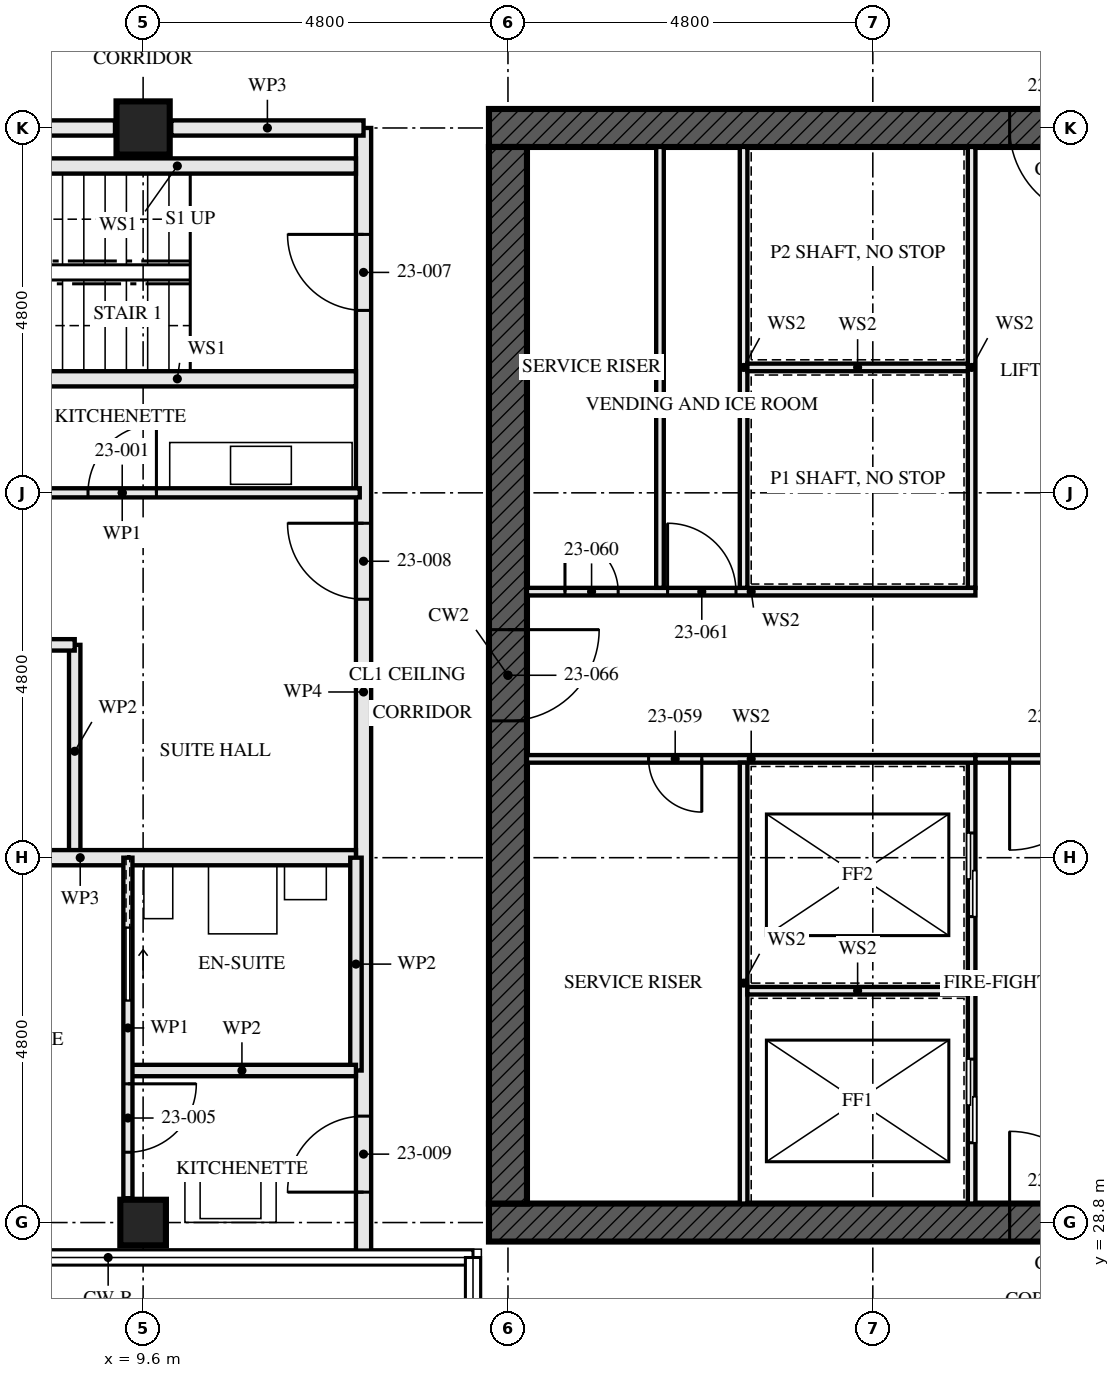
"""IFC4 building model, lengths in metres.
Left out: names, types, materials, properties, quantities, classifications, styles, units other than length and angle.
Written with IfcOpenShell. Run it as: python <this file> out.ifc"""

import sys

from ifc_helpers import new_model, si_unit, direction, frame, frame_2d, origin, origin_2d, place, context, subcontext, project, spatial, rectangle, hollow_rectangle, extrude, element, fill, save


model = new_model("IFC4")
c1 = context("Model", 3, precision=1e-05, world=origin(), true_north=direction((0.0, 1.0)))
c2 = subcontext(c1, "Body", "Model", "MODEL_VIEW")
j1 = project(units=[si_unit("LENGTHUNIT", "METRE"), si_unit("PLANEANGLEUNIT", "RADIAN")], contexts=[c1])
p1 = place(None, origin())
s1 = spatial("IfcSite", under=j1, at=p1, CompositionType="ELEMENT")
p2 = place(p1, origin())
s2 = spatial("IfcBuilding", under=s1, at=p2, CompositionType="ELEMENT")
p3 = place(p2, frame((0.0, 0.0, 87.5)))
s3 = spatial("IfcBuildingStorey", under=s2, at=p3, CompositionType="ELEMENT", Elevation=87.5)
p4 = place(p3, frame((9.6, 28.8, 0.0), z_axis=(0.0, 0.0, 1.0), x_axis=(0.0, 1.0, 0.0)))
e1 = element("IfcColumn", 1, at=p4, inside=s3, PredefinedType="COLUMN", context=c2, shape_type="SweptSolid", body=[
    extrude(hollow_rectangle(XDim=0.6, YDim=0.6, WallThickness=0.08, at=origin_2d()), origin(), (0.0, 0.0, 1.0), 3.5),
])
p5 = place(p3, frame((9.6, 43.2, 0.0), z_axis=(0.0, 0.0, 1.0), x_axis=(0.0, 1.0, 0.0)))
e2 = element("IfcColumn", 2, at=p5, inside=s3, PredefinedType="COLUMN", context=c2, shape_type="SweptSolid", body=[
    extrude(hollow_rectangle(XDim=0.7, YDim=0.7, WallThickness=0.06, at=origin_2d()), origin(), (0.0, 0.0, 1.0), 3.5),
])
p6 = place(p3, frame((14.15, 28.8, -0.17), z_axis=(0.0, 0.0, 1.0), x_axis=(1.0, 0.0, 0.0)))
e3 = element("IfcWall", 3, at=p6, inside=s3, PredefinedType="SHEAR", context=c2, shape_type="SweptSolid", body=[
    extrude(rectangle(XDim=14.9, YDim=0.5, at=frame_2d((7.45, 0.0))), origin(), (0.0, 0.0, 1.0), 3.5),
])
p7 = place(p6, frame((6.85, 0.0, 0.17)))
e4 = element("IfcOpeningElement", 4, at=p7, cuts=e3, PredefinedType="OPENING", context=c2, shape_type="SweptSolid", body=[
    extrude(rectangle(XDim=1.2, YDim=2.1, at=frame_2d((0.6, 1.05))), frame((0.0, 0.26, 0.0), z_axis=(0.0, -1.0, 0.0), x_axis=(1.0, 0.0, 0.0)), (0.0, 0.0, 1.0), 0.521),
])
p8 = place(p3, frame((29.05, 43.2, -0.17), z_axis=(0.0, 0.0, 1.0), x_axis=(-1.0, 0.0, 0.0)))
e5 = element("IfcWall", 5, at=p8, inside=s3, PredefinedType="SHEAR", context=c2, shape_type="SweptSolid", body=[
    extrude(rectangle(XDim=14.9, YDim=0.5, at=frame_2d((7.45, 0.0))), origin(), (0.0, 0.0, 1.0), 3.5),
])
p9 = place(p8, frame((6.85, 0.0, 0.17)))
e6 = element("IfcOpeningElement", 6, at=p9, cuts=e5, PredefinedType="OPENING", context=c2, shape_type="SweptSolid", body=[
    extrude(rectangle(XDim=1.2, YDim=2.1, at=frame_2d((0.6, 1.05))), frame((0.0, 0.26, 0.0), z_axis=(0.0, -1.0, 0.0), x_axis=(1.0, 0.0, 0.0)), (0.0, 0.0, 1.0), 0.521),
])
p10 = place(p3, frame((14.4, 42.95, -0.17), z_axis=(0.0, 0.0, 1.0), x_axis=(0.0, -1.0, 0.0)))
e7 = element("IfcWall", 7, at=p10, inside=s3, PredefinedType="SHEAR", context=c2, shape_type="SweptSolid", body=[
    extrude(rectangle(XDim=13.9, YDim=0.5, at=frame_2d((6.95, 0.0))), origin(), (0.0, 0.0, 1.0), 3.5),
])
p11 = place(p10, frame((6.35, 0.0, 0.17)))
e8 = element("IfcOpeningElement", 8, at=p11, cuts=e7, PredefinedType="OPENING", context=c2, shape_type="SweptSolid", body=[
    extrude(rectangle(XDim=1.2, YDim=2.1, at=frame_2d((0.6, 1.05))), frame((0.0, 0.26, 0.0), z_axis=(0.0, -1.0, 0.0), x_axis=(1.0, 0.0, 0.0)), (0.0, 0.0, 1.0), 0.521),
])
for number, where, z_axis, x_axis in (
    (9, (7.7, 42.7, 0.0), (0.0, 0.0, 1.0), (1.0, 0.0, 0.0)),
    (10, (7.7, 39.9, 0.0), (0.0, 0.0, 1.0), (1.0, 0.0, 0.0)),
):
    element("IfcWall", number, at=place(p3, frame(where, z_axis=z_axis, x_axis=x_axis)), inside=s3, PredefinedType="SOLIDWALL", context=c2, shape_type="SweptSolid", body=[
        extrude(rectangle(XDim=4.7, YDim=0.2, at=frame_2d((2.35, 0.0))), origin(), (0.0, 0.0, 1.0), 2.99),
    ])
p12 = place(p3, frame((5.7, 36.4, 0.0), z_axis=(0.0, 0.0, 1.0), x_axis=(1.0, 0.0, 0.0)))
e11 = element("IfcWall", 11, at=p12, inside=s3, PredefinedType="PARTITIONING", context=c2, shape_type="SweptSolid", body=[
    extrude(rectangle(XDim=3.0, YDim=0.15, at=frame_2d((1.5, 0.0))), origin(), (0.0, 0.0, 1.0), 3.33),
])
p13 = place(p3, frame((8.7, 36.4, 0.0), z_axis=(0.0, 0.0, 1.0), x_axis=(0.0, -1.0, 0.0)))
e12 = element("IfcWall", 12, at=p13, inside=s3, PredefinedType="PARTITIONING", context=c2, shape_type="SweptSolid", body=[
    extrude(rectangle(XDim=2.8, YDim=0.15, at=frame_2d((1.4, 0.0))), origin(), (0.0, 0.0, 1.0), 3.33),
])
p14 = place(p3, frame((6.2, 38.4, 0.0), z_axis=(0.0, 0.0, 1.0), x_axis=(1.0, 0.0, 0.0)))
e13 = element("IfcWall", 13, at=p14, inside=s3, PredefinedType="PARTITIONING", context=c2, shape_type="SweptSolid", body=[
    extrude(rectangle(XDim=6.25, YDim=0.12, at=frame_2d((3.125, 0.0))), origin(), (0.0, 0.0, 1.0), 2.55),
])
p15 = place(p14, frame((2.675, 0.0, 0.0)))
e14 = element("IfcOpeningElement", 14, at=p15, cuts=e13, PredefinedType="OPENING", context=c2, shape_type="SweptSolid", body=[
    extrude(rectangle(XDim=0.9, YDim=2.1, at=frame_2d((0.45, 1.05))), frame((0.0, 0.071, 0.0), z_axis=(0.0, -1.0, 0.0), x_axis=(1.0, 0.0, 0.0)), (0.0, 0.0, 1.0), 0.141),
])
p16 = place(p3, frame((5.145, 33.6, 0.0), z_axis=(0.0, 0.0, 1.0), x_axis=(1.0, 0.0, 0.0)))
e15 = element("IfcWall", 15, at=p16, inside=s3, PredefinedType="PARTITIONING", context=c2, shape_type="SweptSolid", body=[
    extrude(rectangle(XDim=7.255, YDim=0.2, at=frame_2d((3.627, 0.0))), origin(), (0.0, 0.0, 1.0), 2.55),
])
p17 = place(p3, frame((9.4, 30.8, 0.0), z_axis=(0.0, 0.0, 1.0), x_axis=(1.0, 0.0, 0.0)))
e16 = element("IfcWall", 16, at=p17, inside=s3, PredefinedType="PARTITIONING", context=c2, shape_type="SweptSolid", body=[
    extrude(rectangle(XDim=3.0, YDim=0.15, at=frame_2d((1.5, 0.0))), origin(), (0.0, 0.0, 1.0), 3.33),
])
p18 = place(p3, frame((12.4, 33.6, 0.0), z_axis=(0.0, 0.0, 1.0), x_axis=(0.0, -1.0, 0.0)))
e17 = element("IfcWall", 17, at=p18, inside=s3, PredefinedType="PARTITIONING", context=c2, shape_type="SweptSolid", body=[
    extrude(rectangle(XDim=2.8, YDim=0.15, at=frame_2d((1.4, 0.0))), origin(), (0.0, 0.0, 1.0), 3.33),
])
p19 = place(p3, frame((9.4, 33.6, 0.0), z_axis=(0.0, 0.0, 1.0), x_axis=(0.0, -1.0, 0.0)))
e18 = element("IfcWall", 18, at=p19, inside=s3, PredefinedType="PARTITIONING", context=c2, shape_type="SweptSolid", body=[
    extrude(rectangle(XDim=4.48, YDim=0.12, at=frame_2d((2.24, 0.0))), origin(), (0.0, 0.0, 1.0), 3.33),
])
p20 = place(p19, frame((2.975, 0.0, 0.0)))
e19 = element("IfcOpeningElement", 19, at=p20, cuts=e18, PredefinedType="OPENING", context=c2, shape_type="SweptSolid", body=[
    extrude(rectangle(XDim=0.9, YDim=2.1, at=frame_2d((0.45, 1.05))), frame((0.0, 0.071, 0.0), z_axis=(0.0, -1.0, 0.0), x_axis=(1.0, 0.0, 0.0)), (0.0, 0.0, 1.0), 0.141),
])
p21 = place(p19, frame((0.925, 0.0, 0.0)))
e20 = element("IfcOpeningElement", 20, at=p21, cuts=e18, PredefinedType="OPENING", context=c2, shape_type="SweptSolid", body=[
    extrude(rectangle(XDim=0.95, YDim=2.1, at=frame_2d((0.475, 1.05))), frame((0.0, 0.071, 0.0), z_axis=(0.0, -1.0, 0.0), x_axis=(1.0, 0.0, 0.0)), (0.0, 0.0, 1.0), 0.141),
])
p22 = place(p3, frame((12.5, 43.2, 0.0), z_axis=(0.0, 0.0, 1.0), x_axis=(0.0, -1.0, 0.0)))
e21 = element("IfcWall", 21, at=p22, inside=s3, PredefinedType="PARTITIONING", context=c2, shape_type="SweptSolid", body=[
    extrude(rectangle(XDim=14.84, YDim=0.2, at=frame_2d((7.42, 0.0))), origin(), (0.0, 0.0, 1.0), 2.32),
])
p23 = place(p22, frame((1.4, 0.0, 0.0)))
e22 = element("IfcOpeningElement", 22, at=p23, cuts=e21, PredefinedType="OPENING", context=c2, shape_type="SweptSolid", body=[
    extrude(rectangle(XDim=1.0, YDim=2.1, at=frame_2d((0.5, 1.05))), frame((0.0, 0.111, 0.0), z_axis=(0.0, -1.0, 0.0), x_axis=(1.0, 0.0, 0.0)), (0.0, 0.0, 1.0), 0.221),
])
p24 = place(p22, frame((5.2, 0.0, 0.0)))
e23 = element("IfcOpeningElement", 23, at=p24, cuts=e21, PredefinedType="OPENING", context=c2, shape_type="SweptSolid", body=[
    extrude(rectangle(XDim=1.0, YDim=2.1, at=frame_2d((0.5, 1.05))), frame((0.0, 0.111, 0.0), z_axis=(0.0, -1.0, 0.0), x_axis=(1.0, 0.0, 0.0)), (0.0, 0.0, 1.0), 0.221),
])
p25 = place(p22, frame((13.0, 0.0, 0.0)))
e24 = element("IfcOpeningElement", 24, at=p25, cuts=e21, PredefinedType="OPENING", context=c2, shape_type="SweptSolid", body=[
    extrude(rectangle(XDim=1.0, YDim=2.1, at=frame_2d((0.5, 1.05))), frame((0.0, 0.111, 0.0), z_axis=(0.0, -1.0, 0.0), x_axis=(1.0, 0.0, 0.0)), (0.0, 0.0, 1.0), 0.221),
])
p26 = place(p3, frame((16.4, 37.15, 0.0), z_axis=(0.0, 0.0, 1.0), x_axis=(0.0, 1.0, 0.0)))
e25 = element("IfcWall", 25, at=p26, inside=s3, PredefinedType="SOLIDWALL", context=c2, shape_type="SweptSolid", body=[
    extrude(rectangle(XDim=5.8, YDim=0.1, at=frame_2d((2.9, 0.0))), origin(), (0.0, 0.0, 1.0), 3.33),
])
p27 = place(p3, frame((20.5, 29.05, 0.0), z_axis=(0.0, 0.0, 1.0), x_axis=(0.0, 1.0, 0.0)))
e26 = element("IfcWall", 26, at=p27, inside=s3, PredefinedType="SOLIDWALL", context=c2, shape_type="SweptSolid", body=[
    extrude(rectangle(XDim=5.8, YDim=0.1, at=frame_2d((2.9, 0.0))), origin(), (0.0, 0.0, 1.0), 3.33),
])
p28 = place(p27, frame((0.8, 0.0, 0.0)))
e27 = element("IfcOpeningElement", 27, at=p28, cuts=e26, PredefinedType="OPENING", context=c2, shape_type="SweptSolid", body=[
    extrude(rectangle(XDim=1.1, YDim=2.3, at=frame_2d((0.55, 1.15))), frame((0.0, 0.061, 0.0), z_axis=(0.0, -1.0, 0.0), x_axis=(1.0, 0.0, 0.0)), (0.0, 0.0, 1.0), 0.121),
])
p29 = place(p27, frame((3.775, 0.0, 0.0)))
e28 = element("IfcOpeningElement", 28, at=p29, cuts=e26, PredefinedType="OPENING", context=c2, shape_type="SweptSolid", body=[
    extrude(rectangle(XDim=1.1, YDim=2.3, at=frame_2d((0.55, 1.15))), frame((0.0, 0.061, 0.0), z_axis=(0.0, -1.0, 0.0), x_axis=(1.0, 0.0, 0.0)), (0.0, 0.0, 1.0), 0.121),
])
p30 = place(p3, frame((20.5, 37.15, 0.0), z_axis=(0.0, 0.0, 1.0), x_axis=(0.0, 1.0, 0.0)))
e29 = element("IfcWall", 29, at=p30, inside=s3, PredefinedType="SOLIDWALL", context=c2, shape_type="SweptSolid", body=[
    extrude(rectangle(XDim=5.8, YDim=0.1, at=frame_2d((2.9, 0.0))), origin(), (0.0, 0.0, 1.0), 3.33),
])
p31 = place(p3, frame((14.65, 34.9, 0.0), z_axis=(0.0, 0.0, 1.0), x_axis=(1.0, 0.0, 0.0)))
e30 = element("IfcWall", 30, at=p31, inside=s3, PredefinedType="SOLIDWALL", context=c2, shape_type="SweptSolid", body=[
    extrude(rectangle(XDim=5.9, YDim=0.1, at=frame_2d((2.95, 0.0))), origin(), (0.0, 0.0, 1.0), 3.33),
])
p32 = place(p31, frame((1.6, 0.0, 0.0)))
e31 = element("IfcOpeningElement", 31, at=p32, cuts=e30, PredefinedType="OPENING", context=c2, shape_type="SweptSolid", body=[
    extrude(rectangle(XDim=0.7, YDim=2.1, at=frame_2d((0.35, 1.05))), frame((0.0, 0.061, 0.0), z_axis=(0.0, -1.0, 0.0), x_axis=(1.0, 0.0, 0.0)), (0.0, 0.0, 1.0), 0.121),
])
p33 = place(p3, frame((14.65, 37.1, 0.0), z_axis=(0.0, 0.0, 1.0), x_axis=(1.0, 0.0, 0.0)))
e32 = element("IfcWall", 32, at=p33, inside=s3, PredefinedType="SOLIDWALL", context=c2, shape_type="SweptSolid", body=[
    extrude(rectangle(XDim=5.9, YDim=0.1, at=frame_2d((2.95, 0.0))), origin(), (0.0, 0.0, 1.0), 3.33),
])
p34 = place(p33, frame((0.5, 0.0, 0.0)))
e33 = element("IfcOpeningElement", 33, at=p34, cuts=e32, PredefinedType="OPENING", context=c2, shape_type="SweptSolid", body=[
    extrude(rectangle(XDim=0.7, YDim=2.1, at=frame_2d((0.35, 1.05))), frame((0.0, 0.061, 0.0), z_axis=(0.0, -1.0, 0.0), x_axis=(1.0, 0.0, 0.0)), (0.0, 0.0, 1.0), 0.121),
])
p35 = place(p33, frame((1.85, 0.0, 0.0)))
e34 = element("IfcOpeningElement", 34, at=p35, cuts=e32, PredefinedType="OPENING", context=c2, shape_type="SweptSolid", body=[
    extrude(rectangle(XDim=0.9, YDim=2.1, at=frame_2d((0.45, 1.05))), frame((0.0, 0.061, 0.0), z_axis=(0.0, -1.0, 0.0), x_axis=(1.0, 0.0, 0.0)), (0.0, 0.0, 1.0), 0.121),
])
p36 = place(p3, frame((20.55, 34.9, 0.0), z_axis=(0.0, 0.0, 1.0), x_axis=(1.0, 0.0, 0.0)))
e35 = element("IfcWall", 35, at=p36, inside=s3, PredefinedType="SOLIDWALL", context=c2, shape_type="SweptSolid", body=[
    extrude(rectangle(XDim=2.5, YDim=0.1, at=frame_2d((1.25, 0.0))), origin(), (0.0, 0.0, 1.0), 3.33),
])
p37 = place(p36, frame((0.45, 0.0, 0.0)))
e36 = element("IfcOpeningElement", 36, at=p37, cuts=e35, PredefinedType="OPENING", context=c2, shape_type="SweptSolid", body=[
    extrude(rectangle(XDim=1.2, YDim=2.1, at=frame_2d((0.6, 1.05))), frame((0.0, 0.061, 0.0), z_axis=(0.0, -1.0, 0.0), x_axis=(1.0, 0.0, 0.0)), (0.0, 0.0, 1.0), 0.121),
])
p38 = place(p3, frame((17.5, 29.05, 0.0), z_axis=(0.0, 0.0, 1.0), x_axis=(0.0, 1.0, 0.0)))
e37 = element("IfcWall", 37, at=p38, inside=s3, PredefinedType="SOLIDWALL", context=c2, shape_type="SweptSolid", body=[
    extrude(rectangle(XDim=5.8, YDim=0.1, at=frame_2d((2.9, 0.0))), origin(), (0.0, 0.0, 1.0), 3.33),
])
p39 = place(p3, frame((17.55, 31.85, 0.0), z_axis=(0.0, 0.0, 1.0), x_axis=(1.0, 0.0, 0.0)))
e38 = element("IfcWall", 38, at=p39, inside=s3, PredefinedType="SOLIDWALL", context=c2, shape_type="SweptSolid", body=[
    extrude(rectangle(XDim=2.9, YDim=0.1, at=frame_2d((1.45, 0.0))), origin(), (0.0, 0.0, 1.0), 3.33),
])
p40 = place(p3, frame((17.5, 37.15, 0.0), z_axis=(0.0, 0.0, 1.0), x_axis=(0.0, 1.0, 0.0)))
e39 = element("IfcWall", 39, at=p40, inside=s3, PredefinedType="SOLIDWALL", context=c2, shape_type="SweptSolid", body=[
    extrude(rectangle(XDim=5.8, YDim=0.1, at=frame_2d((2.9, 0.0))), origin(), (0.0, 0.0, 1.0), 3.33),
])
p41 = place(p3, frame((17.55, 40.05, 0.0), z_axis=(0.0, 0.0, 1.0), x_axis=(1.0, 0.0, 0.0)))
e40 = element("IfcWall", 40, at=p41, inside=s3, PredefinedType="SOLIDWALL", context=c2, shape_type="SweptSolid", body=[
    extrude(rectangle(XDim=2.9, YDim=0.1, at=frame_2d((1.45, 0.0))), origin(), (0.0, 0.0, 1.0), 3.33),
])
p42 = place(p3, frame((12.5, 43.2, 0.0), z_axis=(0.0, 0.0, 1.0), x_axis=(-1.0, 0.0, 0.0)))
e41 = element("IfcWall", 41, at=p42, inside=s3, PredefinedType="PARTITIONING", context=c2, shape_type="SweptSolid", body=[
    extrude(rectangle(XDim=2.53, YDim=0.2, at=frame_2d((1.265, 0.0))), origin(), (0.0, 0.0, 1.0), 2.32),
])
p43 = place(p3, frame((9.23, 43.2, 0.0), z_axis=(0.0, 0.0, 1.0), x_axis=(-1.0, 0.0, 0.0)))
e42 = element("IfcWall", 42, at=p43, inside=s3, PredefinedType="PARTITIONING", context=c2, shape_type="SweptSolid", body=[
    extrude(rectangle(XDim=4.06, YDim=0.2, at=frame_2d((2.03, 0.0))), origin(), (0.0, 0.0, 1.0), 2.32),
])
p44 = place(p15, origin())
e43 = element("IfcDoor", 43, at=p44, inside=s3, OperationType="SINGLE_SWING_LEFT", PredefinedType="DOOR", context=c2, shape_type="SweptSolid", body=[
    extrude(rectangle(XDim=0.9, YDim=2.1, at=frame_2d((0.45, 1.05))), frame((0.0, 0.022, 0.0), z_axis=(0.0, -1.0, 0.0), x_axis=(1.0, 0.0, 0.0)), (0.0, 0.0, 1.0), 0.044),
])
fill(e14, e43)
p45 = place(p20, origin())
e44 = element("IfcDoor", 44, at=p45, inside=s3, OperationType="SINGLE_SWING_RIGHT", PredefinedType="DOOR", context=c2, shape_type="SweptSolid", body=[
    extrude(rectangle(XDim=0.9, YDim=2.1, at=frame_2d((0.45, 1.05))), frame((0.0, 0.022, 0.0), z_axis=(0.0, -1.0, 0.0), x_axis=(1.0, 0.0, 0.0)), (0.0, 0.0, 1.0), 0.044),
])
fill(e19, e44)
p46 = place(p21, origin())
e45 = element("IfcDoor", 45, at=p46, inside=s3, OperationType="SLIDING_TO_RIGHT", PredefinedType="DOOR", context=c2, shape_type="SweptSolid", body=[
    extrude(rectangle(XDim=0.95, YDim=2.1, at=frame_2d((0.475, 1.05))), frame((0.0, 0.022, 0.0), z_axis=(0.0, -1.0, 0.0), x_axis=(1.0, 0.0, 0.0)), (0.0, 0.0, 1.0), 0.044),
])
fill(e20, e45)
p47 = place(p23, frame((1.0, 0.0, 0.0), z_axis=(0.0, 0.0, 1.0), x_axis=(-1.0, 0.0, 0.0)))
e46 = element("IfcDoor", 46, at=p47, inside=s3, OperationType="SINGLE_SWING_LEFT", PredefinedType="DOOR", context=c2, shape_type="SweptSolid", body=[
    extrude(rectangle(XDim=1.0, YDim=2.1, at=frame_2d((0.5, 1.05))), frame((0.0, 0.032, 0.0), z_axis=(0.0, -1.0, 0.0), x_axis=(1.0, 0.0, 0.0)), (0.0, 0.0, 1.0), 0.064),
])
fill(e22, e46)
p48 = place(p24, frame((1.0, 0.0, 0.0), z_axis=(0.0, 0.0, 1.0), x_axis=(-1.0, 0.0, 0.0)))
e47 = element("IfcDoor", 47, at=p48, inside=s3, OperationType="SINGLE_SWING_LEFT", PredefinedType="DOOR", context=c2, shape_type="SweptSolid", body=[
    extrude(rectangle(XDim=1.0, YDim=2.1, at=frame_2d((0.5, 1.05))), frame((0.0, 0.027, 0.0), z_axis=(0.0, -1.0, 0.0), x_axis=(1.0, 0.0, 0.0)), (0.0, 0.0, 1.0), 0.054),
])
fill(e23, e47)
p49 = place(p25, frame((1.0, 0.0, 0.0), z_axis=(0.0, 0.0, 1.0), x_axis=(-1.0, 0.0, 0.0)))
e48 = element("IfcDoor", 48, at=p49, inside=s3, OperationType="SINGLE_SWING_RIGHT", PredefinedType="DOOR", context=c2, shape_type="SweptSolid", body=[
    extrude(rectangle(XDim=1.0, YDim=2.1, at=frame_2d((0.5, 1.05))), frame((0.0, 0.027, 0.0), z_axis=(0.0, -1.0, 0.0), x_axis=(1.0, 0.0, 0.0)), (0.0, 0.0, 1.0), 0.054),
])
fill(e24, e48)
p50 = place(p28, origin())
e49 = element("IfcDoor", 49, at=p50, inside=s3, OperationType="SLIDING_TO_LEFT", PredefinedType="DOOR", context=c2, shape_type="SweptSolid", body=[
    extrude(rectangle(XDim=1.1, YDim=2.3, at=frame_2d((0.55, 1.15))), frame((0.0, 0.05, 0.0), z_axis=(0.0, -1.0, 0.0), x_axis=(1.0, 0.0, 0.0)), (0.0, 0.0, 1.0), 0.1),
])
fill(e27, e49)
p51 = place(p29, origin())
e50 = element("IfcDoor", 50, at=p51, inside=s3, OperationType="SLIDING_TO_LEFT", PredefinedType="DOOR", context=c2, shape_type="SweptSolid", body=[
    extrude(rectangle(XDim=1.1, YDim=2.3, at=frame_2d((0.55, 1.15))), frame((0.0, 0.05, 0.0), z_axis=(0.0, -1.0, 0.0), x_axis=(1.0, 0.0, 0.0)), (0.0, 0.0, 1.0), 0.1),
])
fill(e28, e50)
p52 = place(p32, frame((0.7, 0.0, 0.0), z_axis=(0.0, 0.0, 1.0), x_axis=(-1.0, 0.0, 0.0)))
e51 = element("IfcDoor", 51, at=p52, inside=s3, OperationType="SINGLE_SWING_RIGHT", PredefinedType="DOOR", context=c2, shape_type="SweptSolid", body=[
    extrude(rectangle(XDim=0.7, YDim=2.1, at=frame_2d((0.35, 1.05))), frame((0.0, 0.027, 0.0), z_axis=(0.0, -1.0, 0.0), x_axis=(1.0, 0.0, 0.0)), (0.0, 0.0, 1.0), 0.054),
])
fill(e31, e51)
p53 = place(p34, origin())
e52 = element("IfcDoor", 52, at=p53, inside=s3, OperationType="SINGLE_SWING_RIGHT", PredefinedType="DOOR", context=c2, shape_type="SweptSolid", body=[
    extrude(rectangle(XDim=0.7, YDim=2.1, at=frame_2d((0.35, 1.05))), frame((0.0, 0.027, 0.0), z_axis=(0.0, -1.0, 0.0), x_axis=(1.0, 0.0, 0.0)), (0.0, 0.0, 1.0), 0.054),
])
fill(e33, e52)
p54 = place(p35, origin())
e53 = element("IfcDoor", 53, at=p54, inside=s3, OperationType="SINGLE_SWING_RIGHT", PredefinedType="DOOR", context=c2, shape_type="SweptSolid", body=[
    extrude(rectangle(XDim=0.9, YDim=2.1, at=frame_2d((0.45, 1.05))), frame((0.0, 0.027, 0.0), z_axis=(0.0, -1.0, 0.0), x_axis=(1.0, 0.0, 0.0)), (0.0, 0.0, 1.0), 0.054),
])
fill(e34, e53)
p55 = place(p37, frame((1.2, 0.0, 0.0), z_axis=(0.0, 0.0, 1.0), x_axis=(-1.0, 0.0, 0.0)))
e54 = element("IfcDoor", 54, at=p55, inside=s3, OperationType="SINGLE_SWING_LEFT", PredefinedType="DOOR", context=c2, shape_type="SweptSolid", body=[
    extrude(rectangle(XDim=1.2, YDim=2.1, at=frame_2d((0.6, 1.05))), frame((0.0, 0.027, 0.0), z_axis=(0.0, -1.0, 0.0), x_axis=(1.0, 0.0, 0.0)), (0.0, 0.0, 1.0), 0.054),
])
fill(e36, e54)
p56 = place(p7, origin())
e55 = element("IfcDoor", 55, at=p56, inside=s3, OperationType="SINGLE_SWING_LEFT", PredefinedType="DOOR", context=c2, shape_type="SweptSolid", body=[
    extrude(rectangle(XDim=1.2, YDim=2.1, at=frame_2d((0.6, 1.05))), frame((0.0, 0.027, 0.0), z_axis=(0.0, -1.0, 0.0), x_axis=(1.0, 0.0, 0.0)), (0.0, 0.0, 1.0), 0.054),
])
fill(e4, e55)
p57 = place(p11, origin())
e56 = element("IfcDoor", 56, at=p57, inside=s3, OperationType="SINGLE_SWING_LEFT", PredefinedType="DOOR", context=c2, shape_type="SweptSolid", body=[
    extrude(rectangle(XDim=1.2, YDim=2.1, at=frame_2d((0.6, 1.05))), frame((0.0, 0.027, 0.0), z_axis=(0.0, -1.0, 0.0), x_axis=(1.0, 0.0, 0.0)), (0.0, 0.0, 1.0), 0.054),
])
fill(e8, e56)
p58 = place(p9, origin())
e57 = element("IfcDoor", 57, at=p58, inside=s3, OperationType="SINGLE_SWING_LEFT", PredefinedType="DOOR", context=c2, shape_type="SweptSolid", body=[
    extrude(rectangle(XDim=1.2, YDim=2.1, at=frame_2d((0.6, 1.05))), frame((0.0, 0.027, 0.0), z_axis=(0.0, -1.0, 0.0), x_axis=(1.0, 0.0, 0.0)), (0.0, 0.0, 1.0), 0.054),
])
fill(e6, e57)
save(model, sys.argv[1])
